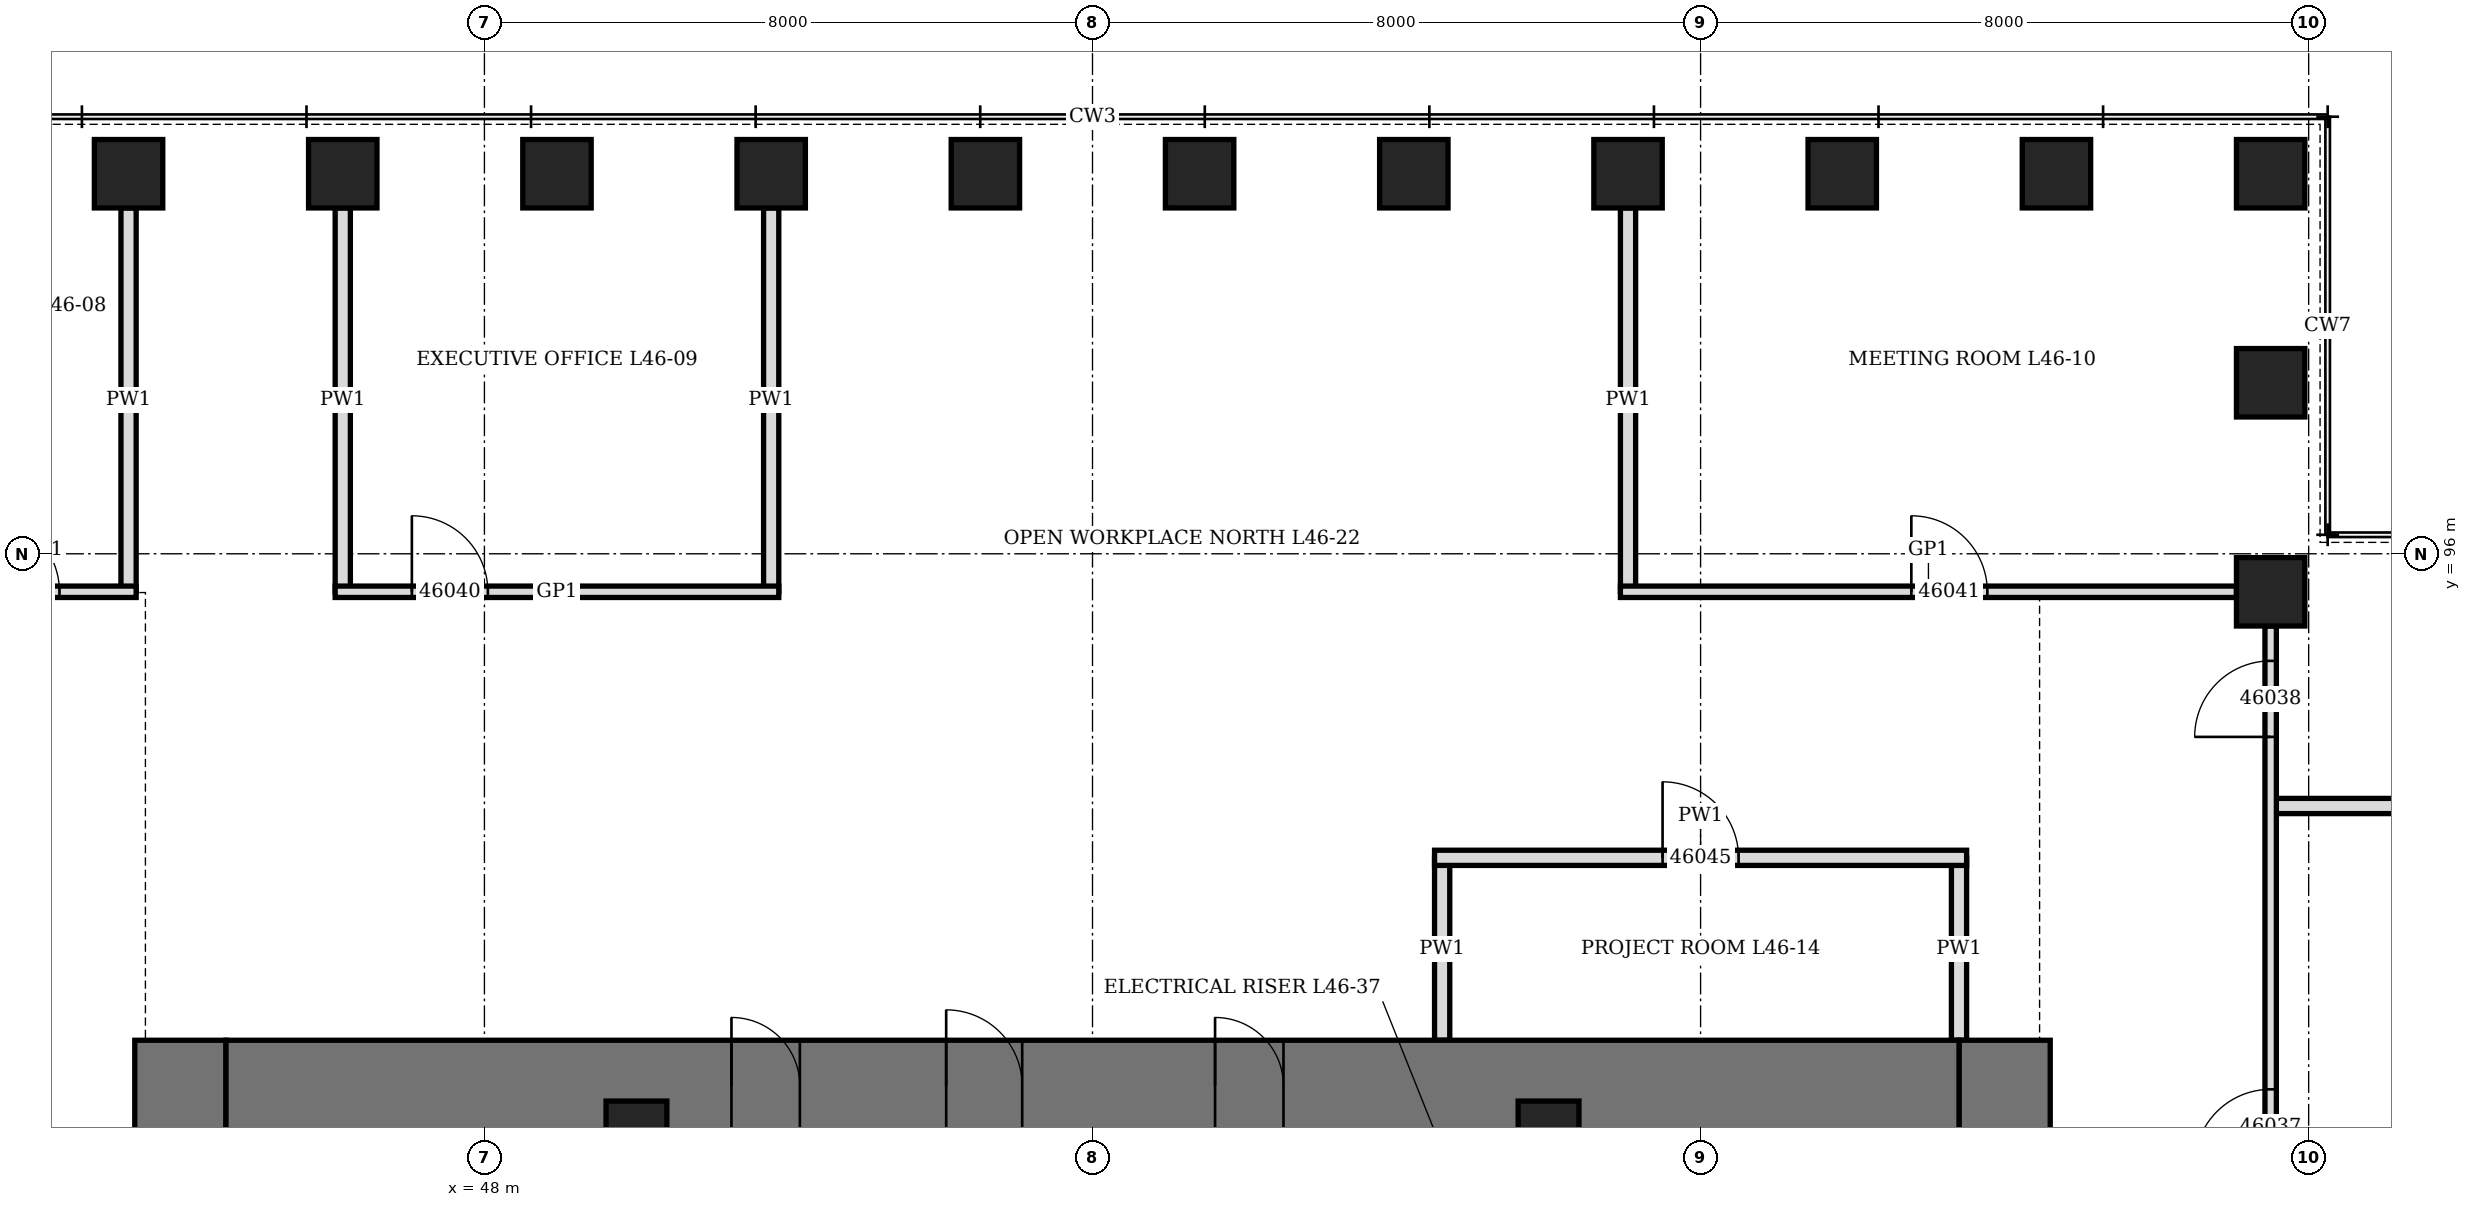
"""IFC4 building model, lengths in metres.
Left out: names, types, materials, properties, quantities, classifications, styles, units other than length and angle.
Written with IfcOpenShell. Run it as: python <this file> out.ifc"""

import sys

from ifc_helpers import new_model, si_unit, direction, frame, frame_2d, origin, origin_2d, place, context, subcontext, project, spatial, rectangle, hollow_rectangle, extrude, element, fill, save


model = new_model("IFC4")
c1 = context("Model", 3, precision=1e-05, world=origin(), true_north=direction((0.0, 1.0)))
c2 = subcontext(c1, "Body", "Model", "MODEL_VIEW")
j1 = project(units=[si_unit("LENGTHUNIT", "METRE"), si_unit("PLANEANGLEUNIT", "RADIAN")], contexts=[c1])
p1 = place(None, origin())
s1 = spatial("IfcSite", under=j1, at=p1, CompositionType="ELEMENT")
p2 = place(p1, origin())
s2 = spatial("IfcBuilding", under=s1, at=p2, CompositionType="ELEMENT")
p3 = place(p2, frame((0.0, 0.0, 206.5)))
s3 = spatial("IfcBuildingStorey", under=s2, at=p3, CompositionType="ELEMENT", Elevation=206.5)
for number, where, z_axis, x_axis in (
    (1, (71.5, 95.5, 0.0), (0.0, 0.0, 1.0), (0.0, 1.0, 0.0)),
    (2, (71.5, 98.25, 0.0), (0.0, 0.0, 1.0), (0.0, 1.0, 0.0)),
    (3, (71.5, 101.0, 0.0), (0.0, 0.0, 1.0), (1.0, 0.0, 0.0)),
    (4, (68.682, 101.0, 0.0), (0.0, 0.0, 1.0), (1.0, 0.0, 0.0)),
    (5, (65.864, 101.0, 0.0), (0.0, 0.0, 1.0), (1.0, 0.0, 0.0)),
    (6, (63.045, 101.0, 0.0), (0.0, 0.0, 1.0), (1.0, 0.0, 0.0)),
    (7, (60.227, 101.0, 0.0), (0.0, 0.0, 1.0), (1.0, 0.0, 0.0)),
    (8, (57.409, 101.0, 0.0), (0.0, 0.0, 1.0), (1.0, 0.0, 0.0)),
    (9, (54.591, 101.0, 0.0), (0.0, 0.0, 1.0), (1.0, 0.0, 0.0)),
    (10, (51.773, 101.0, 0.0), (0.0, 0.0, 1.0), (1.0, 0.0, 0.0)),
    (11, (48.955, 101.0, 0.0), (0.0, 0.0, 1.0), (1.0, 0.0, 0.0)),
    (12, (46.136, 101.0, 0.0), (0.0, 0.0, 1.0), (1.0, 0.0, 0.0)),
    (13, (43.318, 101.0, 0.0), (0.0, 0.0, 1.0), (1.0, 0.0, 0.0)),
):
    element("IfcColumn", number, at=place(p3, frame(where, z_axis=z_axis, x_axis=x_axis)), inside=s3, PredefinedType="COLUMN", context=c2, shape_type="SweptSolid", body=[
        extrude(hollow_rectangle(XDim=0.9, YDim=0.9, WallThickness=0.12, at=origin_2d()), origin(), (0.0, 0.0, 1.0), 4.2),
    ])
p4 = place(p3, frame((44.0, 70.4, 0.0), z_axis=(0.0, 0.0, 1.0), x_axis=(0.0, 1.0, 0.0)))
e14 = element("IfcWall", 14, at=p4, inside=s3, PredefinedType="SHEAR", context=c2, shape_type="SweptSolid", body=[
    extrude(rectangle(XDim=19.2, YDim=1.2, at=frame_2d((9.6, 0.0))), origin(), (0.0, 0.0, 1.0), 4.2),
])
p5 = place(p4, frame((8.6, 0.0, 0.0)))
e15 = element("IfcOpeningElement", 15, at=p5, cuts=e14, PredefinedType="OPENING", context=c2, shape_type="SweptSolid", body=[
    extrude(rectangle(XDim=2.0, YDim=2.4, at=frame_2d((1.0, 1.2))), frame((0.0, 0.61, 0.0), z_axis=(0.0, -1.0, 0.0), x_axis=(1.0, 0.0, 0.0)), (0.0, 0.0, 1.0), 1.22),
])
p6 = place(p3, frame((68.0, 70.4, 0.0), z_axis=(0.0, 0.0, 1.0), x_axis=(0.0, 1.0, 0.0)))
e16 = element("IfcWall", 16, at=p6, inside=s3, PredefinedType="SHEAR", context=c2, shape_type="SweptSolid", body=[
    extrude(rectangle(XDim=19.2, YDim=1.2, at=frame_2d((9.6, 0.0))), origin(), (0.0, 0.0, 1.0), 4.2),
])
p7 = place(p6, frame((8.6, 0.0, 0.0)))
e17 = element("IfcOpeningElement", 17, at=p7, cuts=e16, PredefinedType="OPENING", context=c2, shape_type="SweptSolid", body=[
    extrude(rectangle(XDim=2.0, YDim=2.4, at=frame_2d((1.0, 1.2))), frame((0.0, 0.61, 0.0), z_axis=(0.0, -1.0, 0.0), x_axis=(1.0, 0.0, 0.0)), (0.0, 0.0, 1.0), 1.22),
])
p8 = place(p3, frame((44.6, 89.0, 0.0), z_axis=(0.0, 0.0, 1.0), x_axis=(1.0, 0.0, 0.0)))
e18 = element("IfcWall", 18, at=p8, inside=s3, PredefinedType="SHEAR", context=c2, shape_type="SweptSolid", body=[
    extrude(rectangle(XDim=22.8, YDim=1.2, at=frame_2d((11.4, 0.0))), origin(), (0.0, 0.0, 1.0), 4.2),
])
p9 = place(p8, frame((9.475, 0.0, 0.0)))
e19 = element("IfcOpeningElement", 19, at=p9, cuts=e18, PredefinedType="OPENING", context=c2, shape_type="SweptSolid", body=[
    extrude(rectangle(XDim=1.0, YDim=2.1, at=frame_2d((0.5, 1.05))), frame((0.0, 0.61, 0.0), z_axis=(0.0, -1.0, 0.0), x_axis=(1.0, 0.0, 0.0)), (0.0, 0.0, 1.0), 1.22),
])
p10 = place(p8, frame((6.65, 0.0, 0.0)))
e20 = element("IfcOpeningElement", 20, at=p10, cuts=e18, PredefinedType="OPENING", context=c2, shape_type="SweptSolid", body=[
    extrude(rectangle(XDim=0.9, YDim=2.1, at=frame_2d((0.45, 1.05))), frame((0.0, 0.61, 0.0), z_axis=(0.0, -1.0, 0.0), x_axis=(1.0, 0.0, 0.0)), (0.0, 0.0, 1.0), 1.22),
])
p11 = place(p8, frame((13.012, 0.0, 0.0)))
e21 = element("IfcOpeningElement", 21, at=p11, cuts=e18, PredefinedType="OPENING", context=c2, shape_type="SweptSolid", body=[
    extrude(rectangle(XDim=0.9, YDim=2.1, at=frame_2d((0.45, 1.05))), frame((0.0, 0.61, 0.0), z_axis=(0.0, -1.0, 0.0), x_axis=(1.0, 0.0, 0.0)), (0.0, 0.0, 1.0), 1.22),
])
for number, where, z_axis, x_axis in (
    (22, (50.0, 88.4, 0.0), (0.0, 0.0, 1.0), (1.0, 0.0, 0.0)),
    (23, (62.0, 88.4, 0.0), (0.0, 0.0, 1.0), (1.0, 0.0, 0.0)),
):
    element("IfcColumn", number, at=place(p3, frame(where, z_axis=z_axis, x_axis=x_axis)), inside=s3, PredefinedType="COLUMN", context=c2, shape_type="SweptSolid", body=[
        extrude(hollow_rectangle(XDim=0.8, YDim=0.8, WallThickness=0.1, at=origin_2d()), origin(), (0.0, 0.0, 1.0), 4.2),
    ])
for number, where, z_axis, x_axis in (
    (24, (71.5, 92.682, 0.0), (0.0, 0.0, 1.0), (1.0, 0.0, 0.0)),
    (25, (43.318, 95.5, 0.0), (0.0, 0.0, 1.0), (0.0, 1.0, 0.0)),
    (26, (46.136, 95.5, 0.0), (0.0, 0.0, 1.0), (0.0, 1.0, 0.0)),
    (27, (51.773, 95.5, 0.0), (0.0, 0.0, 1.0), (0.0, 1.0, 0.0)),
    (28, (63.045, 95.5, 0.0), (0.0, 0.0, 1.0), (0.0, 1.0, 0.0)),
):
    element("IfcWall", number, at=place(p3, frame(where, z_axis=z_axis, x_axis=x_axis)), inside=s3, PredefinedType="PARTITIONING", context=c2, shape_type="SweptSolid", body=[
        extrude(rectangle(XDim=5.05, YDim=0.2, at=frame_2d((2.525, 0.0))), origin(), (0.0, 0.0, 1.0), 3.428),
    ])
for number, where, z_axis, x_axis in (
    (29, (60.6, 89.6, 0.0), (0.0, 0.0, 1.0), (0.0, 1.0, 0.0)),
    (30, (67.4, 89.6, 0.0), (0.0, 0.0, 1.0), (0.0, 1.0, 0.0)),
):
    element("IfcWall", number, at=place(p3, frame(where, z_axis=z_axis, x_axis=x_axis)), inside=s3, PredefinedType="PARTITIONING", context=c2, shape_type="SweptSolid", body=[
        extrude(rectangle(XDim=2.4, YDim=0.2, at=frame_2d((1.2, 0.0))), origin(), (0.0, 0.0, 1.0), 4.04),
    ])
p12 = place(p3, frame((60.5, 92.0, 0.0), z_axis=(0.0, 0.0, 1.0), x_axis=(1.0, 0.0, 0.0)))
e31 = element("IfcWall", 31, at=p12, inside=s3, PredefinedType="PARTITIONING", context=c2, shape_type="SweptSolid", body=[
    extrude(rectangle(XDim=7.0, YDim=0.2, at=frame_2d((3.5, 0.0))), origin(), (0.0, 0.0, 1.0), 4.04),
])
p13 = place(p12, frame((3.0, 0.0, 0.0)))
e32 = element("IfcOpeningElement", 32, at=p13, cuts=e31, PredefinedType="OPENING", context=c2, shape_type="SweptSolid", body=[
    extrude(rectangle(XDim=1.0, YDim=2.1, at=frame_2d((0.5, 1.05))), frame((0.0, 0.11, 0.0), z_axis=(0.0, -1.0, 0.0), x_axis=(1.0, 0.0, 0.0)), (0.0, 0.0, 1.0), 0.22),
])
p14 = place(p3, frame((40.95, 95.5, 0.0), z_axis=(0.0, 0.0, 1.0), x_axis=(1.0, 0.0, 0.0)))
e33 = element("IfcWall", 33, at=p14, inside=s3, PredefinedType="PARTITIONING", context=c2, shape_type="SweptSolid", body=[
    extrude(rectangle(XDim=2.468, YDim=0.15, at=frame_2d((1.234, 0.0))), origin(), (0.0, 0.0, 1.0), 4.04),
])
p15 = place(p14, frame((0.459, 0.0, 0.0)))
e34 = element("IfcOpeningElement", 34, at=p15, cuts=e33, PredefinedType="OPENING", context=c2, shape_type="SweptSolid", body=[
    extrude(rectangle(XDim=1.0, YDim=2.4, at=frame_2d((0.5, 1.2))), frame((0.0, 0.085, 0.0), z_axis=(0.0, -1.0, 0.0), x_axis=(1.0, 0.0, 0.0)), (0.0, 0.0, 1.0), 0.17),
])
p16 = place(p3, frame((46.036, 95.5, 0.0), z_axis=(0.0, 0.0, 1.0), x_axis=(1.0, 0.0, 0.0)))
e35 = element("IfcWall", 35, at=p16, inside=s3, PredefinedType="PARTITIONING", context=c2, shape_type="SweptSolid", body=[
    extrude(rectangle(XDim=5.836, YDim=0.15, at=frame_2d((2.918, 0.0))), origin(), (0.0, 0.0, 1.0), 4.04),
])
p17 = place(p16, frame((1.009, 0.0, 0.0)))
e36 = element("IfcOpeningElement", 36, at=p17, cuts=e35, PredefinedType="OPENING", context=c2, shape_type="SweptSolid", body=[
    extrude(rectangle(XDim=1.0, YDim=2.1, at=frame_2d((0.5, 1.05))), frame((0.0, 0.085, 0.0), z_axis=(0.0, -1.0, 0.0), x_axis=(1.0, 0.0, 0.0)), (0.0, 0.0, 1.0), 0.17),
])
p18 = place(p3, frame((62.946, 95.5, 0.0), z_axis=(0.0, 0.0, 1.0), x_axis=(1.0, 0.0, 0.0)))
e37 = element("IfcWall", 37, at=p18, inside=s3, PredefinedType="PARTITIONING", context=c2, shape_type="SweptSolid", body=[
    extrude(rectangle(XDim=8.104, YDim=0.15, at=frame_2d((4.052, 0.0))), origin(), (0.0, 0.0, 1.0), 4.04),
])
p19 = place(p18, frame((3.827, 0.0, 0.0)))
e38 = element("IfcOpeningElement", 38, at=p19, cuts=e37, PredefinedType="OPENING", context=c2, shape_type="SweptSolid", body=[
    extrude(rectangle(XDim=1.0, YDim=2.4, at=frame_2d((0.5, 1.2))), frame((0.0, 0.085, 0.0), z_axis=(0.0, -1.0, 0.0), x_axis=(1.0, 0.0, 0.0)), (0.0, 0.0, 1.0), 0.17),
])
p20 = place(p3, frame((71.5, 81.309, 0.0), z_axis=(0.0, 0.0, 1.0), x_axis=(0.0, 1.0, 0.0)))
e39 = element("IfcWall", 39, at=p20, inside=s3, PredefinedType="PARTITIONING", context=c2, shape_type="SweptSolid", body=[
    extrude(rectangle(XDim=13.741, YDim=0.15, at=frame_2d((6.871, 0.0))), origin(), (0.0, 0.0, 1.0), 4.04),
])
p21 = place(p20, frame((1.009, 0.0, 0.0)))
e40 = element("IfcOpeningElement", 40, at=p21, cuts=e39, PredefinedType="OPENING", context=c2, shape_type="SweptSolid", body=[
    extrude(rectangle(XDim=1.0, YDim=2.1, at=frame_2d((0.5, 1.05))), frame((0.0, 0.085, 0.0), z_axis=(0.0, -1.0, 0.0), x_axis=(1.0, 0.0, 0.0)), (0.0, 0.0, 1.0), 0.17),
])
p22 = place(p20, frame((6.646, 0.0, 0.0)))
e41 = element("IfcOpeningElement", 41, at=p22, cuts=e39, PredefinedType="OPENING", context=c2, shape_type="SweptSolid", body=[
    extrude(rectangle(XDim=1.0, YDim=2.1, at=frame_2d((0.5, 1.05))), frame((0.0, 0.085, 0.0), z_axis=(0.0, -1.0, 0.0), x_axis=(1.0, 0.0, 0.0)), (0.0, 0.0, 1.0), 0.17),
])
p23 = place(p20, frame((12.282, 0.0, 0.0)))
e42 = element("IfcOpeningElement", 42, at=p23, cuts=e39, PredefinedType="OPENING", context=c2, shape_type="SweptSolid", body=[
    extrude(rectangle(XDim=1.0, YDim=2.4, at=frame_2d((0.5, 1.2))), frame((0.0, 0.085, 0.0), z_axis=(0.0, -1.0, 0.0), x_axis=(1.0, 0.0, 0.0)), (0.0, 0.0, 1.0), 0.17),
])
p24 = place(p9, origin())
e43 = element("IfcDoor", 43, at=p24, inside=s3, OperationType="SINGLE_SWING_LEFT", PredefinedType="DOOR", context=c2, shape_type="SweptSolid", body=[
    extrude(rectangle(XDim=1.0, YDim=2.1, at=frame_2d((0.5, 1.05))), frame((0.0, 0.35, 0.0), z_axis=(0.0, -1.0, 0.0), x_axis=(1.0, 0.0, 0.0)), (0.0, 0.0, 1.0), 0.7),
])
fill(e19, e43)
p25 = place(p10, origin())
e44 = element("IfcDoor", 44, at=p25, inside=s3, OperationType="SINGLE_SWING_LEFT", PredefinedType="DOOR", context=c2, shape_type="SweptSolid", body=[
    extrude(rectangle(XDim=0.9, YDim=2.1, at=frame_2d((0.45, 1.05))), frame((0.0, 0.35, 0.0), z_axis=(0.0, -1.0, 0.0), x_axis=(1.0, 0.0, 0.0)), (0.0, 0.0, 1.0), 0.7),
])
fill(e20, e44)
p26 = place(p11, origin())
e45 = element("IfcDoor", 45, at=p26, inside=s3, OperationType="SINGLE_SWING_LEFT", PredefinedType="DOOR", context=c2, shape_type="SweptSolid", body=[
    extrude(rectangle(XDim=0.9, YDim=2.1, at=frame_2d((0.45, 1.05))), frame((0.0, 0.35, 0.0), z_axis=(0.0, -1.0, 0.0), x_axis=(1.0, 0.0, 0.0)), (0.0, 0.0, 1.0), 0.7),
])
fill(e21, e45)
p27 = place(p22, origin())
e46 = element("IfcDoor", 46, at=p27, inside=s3, OperationType="SINGLE_SWING_LEFT", PredefinedType="DOOR", context=c2, shape_type="SweptSolid", body=[
    extrude(rectangle(XDim=1.0, YDim=2.1, at=frame_2d((0.5, 1.05))), frame((0.0, 0.075, 0.0), z_axis=(0.0, -1.0, 0.0), x_axis=(1.0, 0.0, 0.0)), (0.0, 0.0, 1.0), 0.149),
])
fill(e41, e46)
p28 = place(p23, origin())
e47 = element("IfcDoor", 47, at=p28, inside=s3, OperationType="SINGLE_SWING_RIGHT", PredefinedType="DOOR", context=c2, shape_type="SweptSolid", body=[
    extrude(rectangle(XDim=1.0, YDim=2.4, at=frame_2d((0.5, 1.2))), frame((0.0, 0.075, 0.0), z_axis=(0.0, -1.0, 0.0), x_axis=(1.0, 0.0, 0.0)), (0.0, 0.0, 1.0), 0.149),
])
fill(e42, e47)
p29 = place(p15, origin())
e48 = element("IfcDoor", 48, at=p29, inside=s3, OperationType="SINGLE_SWING_RIGHT", PredefinedType="DOOR", context=c2, shape_type="SweptSolid", body=[
    extrude(rectangle(XDim=1.0, YDim=2.4, at=frame_2d((0.5, 1.2))), frame((0.0, 0.075, 0.0), z_axis=(0.0, -1.0, 0.0), x_axis=(1.0, 0.0, 0.0)), (0.0, 0.0, 1.0), 0.149),
])
fill(e34, e48)
p30 = place(p17, origin())
e49 = element("IfcDoor", 49, at=p30, inside=s3, OperationType="SINGLE_SWING_LEFT", PredefinedType="DOOR", context=c2, shape_type="SweptSolid", body=[
    extrude(rectangle(XDim=1.0, YDim=2.1, at=frame_2d((0.5, 1.05))), frame((0.0, 0.075, 0.0), z_axis=(0.0, -1.0, 0.0), x_axis=(1.0, 0.0, 0.0)), (0.0, 0.0, 1.0), 0.149),
])
fill(e36, e49)
p31 = place(p19, origin())
e50 = element("IfcDoor", 50, at=p31, inside=s3, OperationType="SINGLE_SWING_RIGHT", PredefinedType="DOOR", context=c2, shape_type="SweptSolid", body=[
    extrude(rectangle(XDim=1.0, YDim=2.4, at=frame_2d((0.5, 1.2))), frame((0.0, 0.075, 0.0), z_axis=(0.0, -1.0, 0.0), x_axis=(1.0, 0.0, 0.0)), (0.0, 0.0, 1.0), 0.149),
])
fill(e38, e50)
p32 = place(p13, origin())
e51 = element("IfcDoor", 51, at=p32, inside=s3, OperationType="SINGLE_SWING_LEFT", PredefinedType="DOOR", context=c2, shape_type="SweptSolid", body=[
    extrude(rectangle(XDim=1.0, YDim=2.1, at=frame_2d((0.5, 1.05))), frame((0.0, 0.1, 0.0), z_axis=(0.0, -1.0, 0.0), x_axis=(1.0, 0.0, 0.0)), (0.0, 0.0, 1.0), 0.199),
])
fill(e32, e51)
save(model, sys.argv[1])
